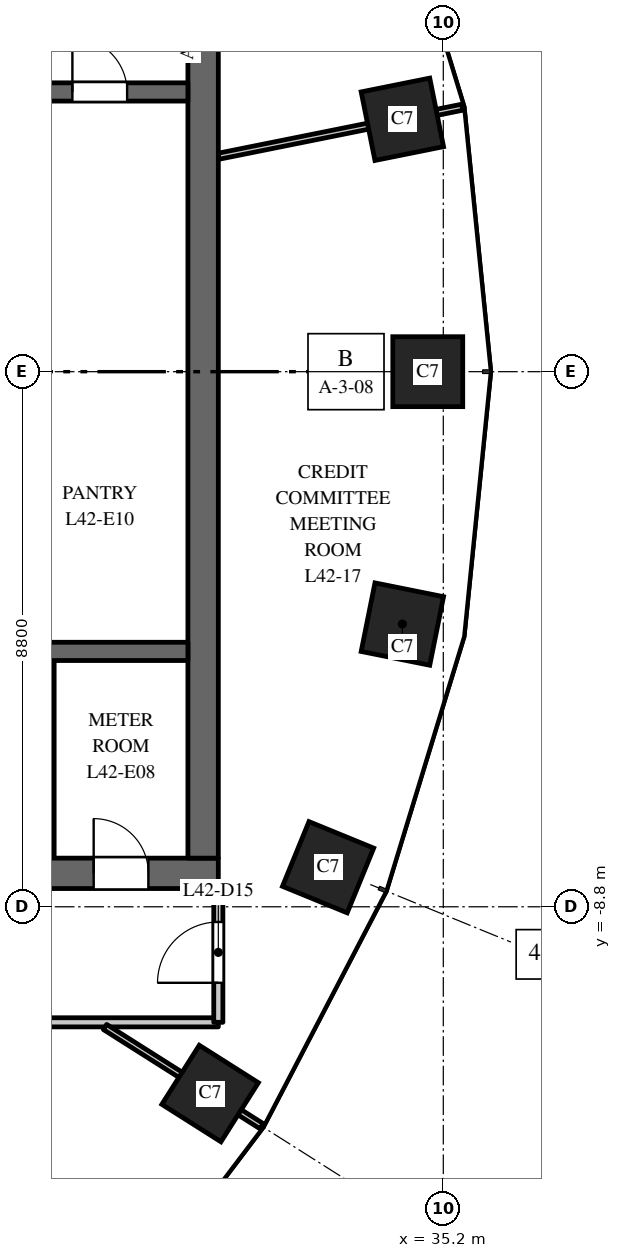
"""IFC4 building model, lengths in metres.
Left out: names, types, materials, properties, quantities, classifications, styles, units other than length and angle.
Written with IfcOpenShell. Run it as: python <this file> out.ifc"""

import sys

from ifc_helpers import new_model, si_unit, direction, frame, frame_2d, origin, origin_2d, place, context, subcontext, project, spatial, rectangle, extrude, element, fill, save


model = new_model("IFC4")
c1 = context("Model", 3, precision=1e-05, world=origin(), true_north=direction((0.0, 1.0)))
c2 = subcontext(c1, "Body", "Model", "MODEL_VIEW")
j1 = project(units=[si_unit("LENGTHUNIT", "METRE"), si_unit("PLANEANGLEUNIT", "RADIAN")], contexts=[c1])
p1 = place(None, origin())
s1 = spatial("IfcSite", under=j1, at=p1, CompositionType="ELEMENT")
p2 = place(p1, origin())
s2 = spatial("IfcBuilding", under=s1, at=p2, CompositionType="ELEMENT")
p3 = place(p2, frame((0.0, 0.0, 182.0)))
s3 = spatial("IfcBuildingStorey", under=s2, at=p3, CompositionType="ELEMENT", Elevation=182.0)
for number, where, z_axis, x_axis in (
    (1, (34.945, 0.0, 0.0), (0.0, 0.0, 1.0), (0.0, 1.0, 0.0)),
    (2, (34.527, 4.151, 0.0), (0.0, 0.0, 1.0), (-0.197, 0.98, 0.0)),
    (3, (31.365, -11.871, 0.0), (0.0, 0.0, 1.0), (0.535, 0.845, 0.0)),
    (4, (33.305, -8.149, 0.0), (0.0, 0.0, 1.0), (0.379, 0.925, 0.0)),
    (5, (34.527, -4.151, 0.0), (0.0, 0.0, 1.0), (0.197, 0.98, 0.0)),
):
    element("IfcColumn", number, at=place(p3, frame(where, z_axis=z_axis, x_axis=x_axis)), inside=s3, PredefinedType="COLUMN", context=c2, shape_type="SweptSolid", body=[
        extrude(rectangle(XDim=1.15, YDim=1.15, at=origin_2d()), origin(), (0.0, 0.0, 1.0), 4.0),
    ])
p4 = place(p3, frame((16.5, -8.25, 0.0), z_axis=(0.0, 0.0, 1.0), x_axis=(1.0, 0.0, 0.0)))
e6 = element("IfcWall", 6, at=p4, inside=s3, PredefinedType="SHEAR", context=c2, shape_type="SweptSolid", body=[
    extrude(rectangle(XDim=15.0, YDim=0.5, at=frame_2d((7.5, 0.0))), origin(), (0.0, 0.0, 1.0), 3.7),
])
p5 = place(p4, frame((6.9, 0.0, 0.0)))
e7 = element("IfcOpeningElement", 7, at=p5, cuts=e6, PredefinedType="OPENING", context=c2, shape_type="SweptSolid", body=[
    extrude(rectangle(XDim=1.2, YDim=2.1, at=frame_2d((0.6, 1.05))), frame((0.0, 0.26, 0.0), z_axis=(0.0, -1.0, 0.0), x_axis=(1.0, 0.0, 0.0)), (0.0, 0.0, 1.0), 0.52),
])
p6 = place(p4, frame((12.95, 0.0, 0.0)))
e8 = element("IfcOpeningElement", 8, at=p6, cuts=e6, PredefinedType="OPENING", context=c2, shape_type="SweptSolid", body=[
    extrude(rectangle(XDim=0.9, YDim=2.1, at=frame_2d((0.45, 1.05))), frame((0.0, 0.26, 0.0), z_axis=(0.0, -1.0, 0.0), x_axis=(1.0, 0.0, 0.0)), (0.0, 0.0, 1.0), 0.52),
])
p7 = place(p3, frame((31.25, -8.0, 0.0), z_axis=(0.0, 0.0, 1.0), x_axis=(0.0, 1.0, 0.0)))
e9 = element("IfcWall", 9, at=p7, inside=s3, PredefinedType="SHEAR", context=c2, shape_type="SweptSolid", body=[
    extrude(rectangle(XDim=16.0, YDim=0.5, at=frame_2d((8.0, 0.0))), origin(), (0.0, 0.0, 1.0), 3.7),
])
p8 = place(p3, frame((24.9, 4.6, 0.0), z_axis=(0.0, 0.0, 1.0), x_axis=(1.0, 0.0, 0.0)))
e10 = element("IfcWall", 10, at=p8, inside=s3, PredefinedType="SHEAR", context=c2, shape_type="SweptSolid", body=[
    extrude(rectangle(XDim=6.1, YDim=0.3, at=frame_2d((3.05, 0.0))), origin(), (0.0, 0.0, 1.0), 3.7),
])
p9 = place(p8, frame((4.2, 0.0, 0.0)))
e11 = element("IfcOpeningElement", 11, at=p9, cuts=e10, PredefinedType="OPENING", context=c2, shape_type="SweptSolid", body=[
    extrude(rectangle(XDim=0.9, YDim=2.1, at=frame_2d((0.45, 1.05))), frame((0.0, 0.16, 0.0), z_axis=(0.0, -1.0, 0.0), x_axis=(1.0, 0.0, 0.0)), (0.0, 0.0, 1.0), 0.32),
])
p10 = place(p3, frame((28.7, -8.0, 0.0), z_axis=(0.0, 0.0, 1.0), x_axis=(0.0, 1.0, 0.0)))
e12 = element("IfcWall", 12, at=p10, inside=s3, PredefinedType="PARTITIONING", context=c2, shape_type="SweptSolid", body=[
    extrude(rectangle(XDim=3.25, YDim=0.2, at=frame_2d((1.625, 0.0))), origin(), (0.0, 0.0, 1.0), 3.7),
])
p11 = place(p3, frame((24.9, -4.6, 0.0), z_axis=(0.0, 0.0, 1.0), x_axis=(1.0, 0.0, 0.0)))
e13 = element("IfcWall", 13, at=p11, inside=s3, PredefinedType="SHEAR", context=c2, shape_type="SweptSolid", body=[
    extrude(rectangle(XDim=6.1, YDim=0.3, at=frame_2d((3.05, 0.0))), origin(), (0.0, 0.0, 1.0), 3.7),
])
p12 = place(p3, frame((16.5, -10.7, 0.0), z_axis=(0.0, 0.0, 1.0), x_axis=(1.0, 0.0, 0.0)))
e14 = element("IfcWall", 14, at=p12, inside=s3, PredefinedType="PARTITIONING", context=c2, shape_type="SweptSolid", body=[
    extrude(rectangle(XDim=15.0, YDim=0.15, at=frame_2d((7.5, 0.0))), origin(), (0.0, 0.0, 1.0), 2.75),
])
p13 = place(p12, frame((4.15, 0.0, 0.0)))
e15 = element("IfcOpeningElement", 15, at=p13, cuts=e14, PredefinedType="OPENING", context=c2, shape_type="SweptSolid", body=[
    extrude(rectangle(XDim=1.0, YDim=2.1, at=frame_2d((0.5, 1.05))), frame((0.0, 0.085, 0.0), z_axis=(0.0, -1.0, 0.0), x_axis=(1.0, 0.0, 0.0)), (0.0, 0.0, 1.0), 0.17),
])
p14 = place(p12, frame((7.061, 0.0, 0.0)))
e16 = element("IfcOpeningElement", 16, at=p14, cuts=e14, PredefinedType="OPENING", context=c2, shape_type="SweptSolid", body=[
    extrude(rectangle(XDim=1.0, YDim=2.1, at=frame_2d((0.5, 1.05))), frame((0.0, 0.085, 0.0), z_axis=(0.0, -1.0, 0.0), x_axis=(1.0, 0.0, 0.0)), (0.0, 0.0, 1.0), 0.17),
])
p15 = place(p3, frame((29.637, -10.777, 0.0), z_axis=(0.0, 0.0, 1.0), x_axis=(0.844810627195, -0.535065420467, 0.0)))
e17 = element("IfcWall", 17, at=p15, inside=s3, PredefinedType="PARTITIONING", context=c2, shape_type="SweptSolid", body=[
    extrude(rectangle(XDim=3.048, YDim=0.1, at=frame_2d((1.524, 0.0))), origin(), (0.0, 0.0, 1.0), 2.9),
])
p16 = place(p3, frame((31.5, -10.7, 0.0), z_axis=(0.0, 0.0, 1.0), x_axis=(0.0, 1.0, 0.0)))
e18 = element("IfcWall", 18, at=p16, inside=s3, PredefinedType="PARTITIONING", context=c2, shape_type="SweptSolid", body=[
    extrude(rectangle(XDim=2.2, YDim=0.15, at=frame_2d((1.1, 0.0))), origin(), (0.0, 0.0, 1.0), 2.9),
])
p17 = place(p16, frame((0.65, 0.0, 0.0)))
e19 = element("IfcOpeningElement", 19, at=p17, cuts=e18, PredefinedType="OPENING", context=c2, shape_type="SweptSolid", body=[
    extrude(rectangle(XDim=1.0, YDim=2.1, at=frame_2d((0.5, 1.05))), frame((0.0, 0.085, 0.0), z_axis=(0.0, -1.0, 0.0), x_axis=(1.0, 0.0, 0.0)), (0.0, 0.0, 1.0), 0.17),
])
p18 = place(p3, frame((31.5, 3.542, 0.0), z_axis=(0.0, 0.0, 1.0), x_axis=(0.980357474535, 0.197228857227, 0.0)))
e20 = element("IfcWall", 20, at=p18, inside=s3, PredefinedType="PARTITIONING", context=c2, shape_type="SweptSolid", body=[
    extrude(rectangle(XDim=4.092, YDim=0.1, at=frame_2d((2.046, 0.0))), origin(), (0.0, 0.0, 1.0), 2.9),
])
p19 = place(p6, origin())
e21 = element("IfcDoor", 21, at=p19, inside=s3, OperationType="SINGLE_SWING_RIGHT", PredefinedType="DOOR", context=c2, shape_type="SweptSolid", body=[
    extrude(rectangle(XDim=0.9, YDim=2.1, at=frame_2d((0.45, 1.05))), frame((0.0, 0.025, 0.0), z_axis=(0.0, -1.0, 0.0), x_axis=(1.0, 0.0, 0.0)), (0.0, 0.0, 1.0), 0.05),
])
fill(e8, e21)
p20 = place(p9, origin())
e22 = element("IfcDoor", 22, at=p20, inside=s3, OperationType="SINGLE_SWING_RIGHT", PredefinedType="DOOR", context=c2, shape_type="SweptSolid", body=[
    extrude(rectangle(XDim=0.9, YDim=2.1, at=frame_2d((0.45, 1.05))), frame((0.0, 0.025, 0.0), z_axis=(0.0, -1.0, 0.0), x_axis=(1.0, 0.0, 0.0)), (0.0, 0.0, 1.0), 0.05),
])
fill(e11, e22)
p21 = place(p17, origin())
e23 = element("IfcDoor", 23, at=p21, inside=s3, OperationType="SINGLE_SWING_LEFT", PredefinedType="DOOR", context=c2, shape_type="SweptSolid", body=[
    extrude(rectangle(XDim=1.0, YDim=2.1, at=frame_2d((0.5, 1.05))), frame((0.0, 0.025, 0.0), z_axis=(0.0, -1.0, 0.0), x_axis=(1.0, 0.0, 0.0)), (0.0, 0.0, 1.0), 0.05),
])
fill(e19, e23)
save(model, sys.argv[1])
